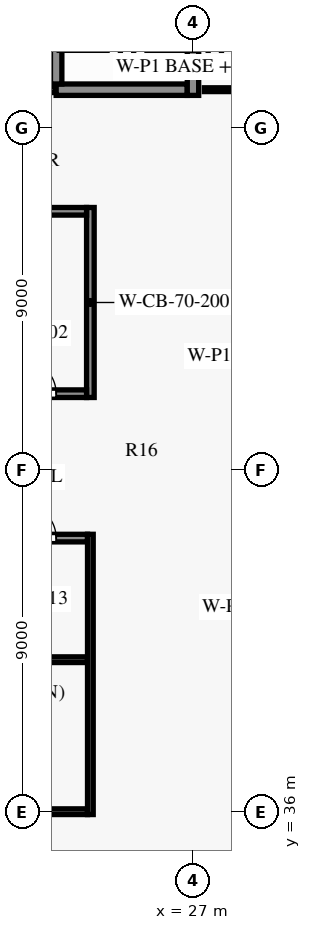
"""IFC4 building model, lengths in metres.
Left out: names, types, materials, properties, quantities, classifications, styles, units other than length and angle.
Written with IfcOpenShell. Run it as: python <this file> out.ifc"""

import sys

from ifc_helpers import new_model, si_unit, direction, frame, frame_2d, origin, place, context, subcontext, project, spatial, rectangle, extrude, element, fill, save


model = new_model("IFC4")
c1 = context("Model", 3, precision=1e-05, world=origin(), true_north=direction((0.0, 1.0)))
c2 = subcontext(c1, "Body", "Model", "MODEL_VIEW")
j1 = project(units=[si_unit("LENGTHUNIT", "METRE"), si_unit("PLANEANGLEUNIT", "RADIAN")], contexts=[c1])
p1 = place(None, origin())
s1 = spatial("IfcSite", under=j1, at=p1, CompositionType="ELEMENT")
p2 = place(p1, origin())
s2 = spatial("IfcBuilding", under=s1, at=p2, CompositionType="ELEMENT")
p3 = place(p2, frame((0.0, 0.0, 130.3)))
s3 = spatial("IfcBuildingStorey", under=s2, at=p3, CompositionType="ELEMENT", Elevation=130.3)
p4 = place(p3, frame((12.4, 36.0, 0.0), z_axis=(0.0, 0.0, 1.0), x_axis=(1.0, 0.0, 0.0)))
e1 = element("IfcWall", 1, at=p4, inside=s3, PredefinedType="SHEAR", context=c2, shape_type="SweptSolid", body=[
    extrude(rectangle(XDim=11.825, YDim=0.15, at=frame_2d((5.913, 0.0))), origin(), (0.0, 0.0, 1.0), 3.5),
])
p5 = place(p4, frame((1.05, 0.0, 0.0)))
e2 = element("IfcOpeningElement", 2, at=p5, cuts=e1, PredefinedType="OPENING", context=c2, shape_type="SweptSolid", body=[
    extrude(rectangle(XDim=0.9, YDim=2.1, at=frame_2d((0.45, 1.05))), frame((0.0, 0.085, 0.0), z_axis=(0.0, -1.0, 0.0), x_axis=(1.0, 0.0, 0.0)), (0.0, 0.0, 1.0), 0.17),
])
p6 = place(p4, frame((4.275, 0.0, 0.0)))
e3 = element("IfcOpeningElement", 3, at=p6, cuts=e1, PredefinedType="OPENING", context=c2, shape_type="SweptSolid", body=[
    extrude(rectangle(XDim=0.95, YDim=2.1, at=frame_2d((0.475, 1.05))), frame((0.0, 0.085, 0.0), z_axis=(0.0, -1.0, 0.0), x_axis=(1.0, 0.0, 0.0)), (0.0, 0.0, 1.0), 0.17),
])
p7 = place(p4, frame((8.75, 0.0, 0.0)))
e4 = element("IfcOpeningElement", 4, at=p7, cuts=e1, PredefinedType="OPENING", context=c2, shape_type="SweptSolid", body=[
    extrude(rectangle(XDim=0.9, YDim=2.1, at=frame_2d((0.45, 1.05))), frame((0.0, 0.085, 0.0), z_axis=(0.0, -1.0, 0.0), x_axis=(1.0, 0.0, 0.0)), (0.0, 0.0, 1.0), 0.17),
])
p8 = place(p3, frame((21.6, 40.0, 0.0), z_axis=(0.0, 0.0, 1.0), x_axis=(1.0, 0.0, 0.0)))
e5 = element("IfcWall", 5, at=p8, inside=s3, PredefinedType="PARTITIONING", context=c2, shape_type="SweptSolid", body=[
    extrude(rectangle(XDim=2.625, YDim=0.15, at=frame_2d((1.312, 0.0))), origin(), (0.0, 0.0, 1.0), 3.5),
])
p9 = place(p3, frame((21.6, 43.2, 0.0), z_axis=(0.0, 0.0, 1.0), x_axis=(1.0, 0.0, 0.0)))
e6 = element("IfcWall", 6, at=p9, inside=s3, PredefinedType="PARTITIONING", context=c2, shape_type="SweptSolid", body=[
    extrude(rectangle(XDim=2.625, YDim=0.2, at=frame_2d((1.312, 0.0))), origin(), (0.0, 0.0, 1.0), 3.5),
])
p10 = place(p9, frame((0.9, 0.0, 0.0)))
e7 = element("IfcOpeningElement", 7, at=p10, cuts=e6, PredefinedType="OPENING", context=c2, shape_type="SweptSolid", body=[
    extrude(rectangle(XDim=0.9, YDim=2.1, at=frame_2d((0.45, 1.05))), frame((0.0, 0.11, 0.0), z_axis=(0.0, -1.0, 0.0), x_axis=(1.0, 0.0, 0.0)), (0.0, 0.0, 1.0), 0.22),
])
p11 = place(p3, frame((21.6, 47.0, 0.0), z_axis=(0.0, 0.0, 1.0), x_axis=(1.0, 0.0, 0.0)))
e8 = element("IfcWall", 8, at=p11, inside=s3, PredefinedType="PARTITIONING", context=c2, shape_type="SweptSolid", body=[
    extrude(rectangle(XDim=2.6, YDim=0.2, at=frame_2d((1.3, 0.0))), origin(), (0.0, 0.0, 1.0), 3.5),
])
p12 = place(p11, frame((0.9, 0.0, 0.0)))
e9 = element("IfcOpeningElement", 9, at=p12, cuts=e8, PredefinedType="OPENING", context=c2, shape_type="SweptSolid", body=[
    extrude(rectangle(XDim=0.9, YDim=2.1, at=frame_2d((0.45, 1.05))), frame((0.0, 0.11, 0.0), z_axis=(0.0, -1.0, 0.0), x_axis=(1.0, 0.0, 0.0)), (0.0, 0.0, 1.0), 0.22),
])
p13 = place(p3, frame((21.6, 51.8, 0.0), z_axis=(0.0, 0.0, 1.0), x_axis=(1.0, 0.0, 0.0)))
e10 = element("IfcWall", 10, at=p13, inside=s3, PredefinedType="PARTITIONING", context=c2, shape_type="SweptSolid", body=[
    extrude(rectangle(XDim=2.6, YDim=0.2, at=frame_2d((1.3, 0.0))), origin(), (0.0, 0.0, 1.0), 3.5),
])
p14 = place(p3, frame((17.5, 55.0, 0.0), z_axis=(0.0, 0.0, 1.0), x_axis=(1.0, 0.0, 0.0)))
e11 = element("IfcWall", 11, at=p14, inside=s3, PredefinedType="PARTITIONING", context=c2, shape_type="SweptSolid", body=[
    extrude(rectangle(XDim=5.9, YDim=0.15, at=frame_2d((2.95, 0.0))), origin(), (0.0, 0.0, 1.0), 3.5),
])
p15 = place(p14, frame((2.45, 0.0, 0.0)))
e12 = element("IfcOpeningElement", 12, at=p15, cuts=e11, PredefinedType="OPENING", context=c2, shape_type="SweptSolid", body=[
    extrude(rectangle(XDim=1.0, YDim=2.1, at=frame_2d((0.5, 1.05))), frame((0.0, 0.085, 0.0), z_axis=(0.0, -1.0, 0.0), x_axis=(1.0, 0.0, 0.0)), (0.0, 0.0, 1.0), 0.17),
])
p16 = place(p3, frame((23.4, 55.0, 0.0), z_axis=(0.0, 0.0, 1.0), x_axis=(1.0, 0.0, 0.0)))
e13 = element("IfcWall", 13, at=p16, inside=s3, PredefinedType="SHEAR", context=c2, shape_type="SweptSolid", body=[
    extrude(rectangle(XDim=3.45, YDim=0.3, at=frame_2d((1.725, 0.0))), origin(), (0.0, 0.0, 1.0), 3.5),
])
p17 = place(p3, frame((23.4, 55.15, 0.0), z_axis=(0.0, 0.0, 1.0), x_axis=(0.0, 1.0, 0.0)))
e14 = element("IfcWall", 14, at=p17, inside=s3, PredefinedType="SHEAR", context=c2, shape_type="SweptSolid", body=[
    extrude(rectangle(XDim=8.0, YDim=0.3, at=frame_2d((4.0, 0.0))), origin(), (0.0, 0.0, 1.0), 3.5),
])
p18 = place(p3, frame((24.3, 35.925, 0.0), z_axis=(0.0, 0.0, 1.0), x_axis=(0.0, 1.0, 0.0)))
e15 = element("IfcWall", 15, at=p18, inside=s3, PredefinedType="PARTITIONING", context=c2, shape_type="SweptSolid", body=[
    extrude(rectangle(XDim=7.375, YDim=0.15, at=frame_2d((3.688, 0.0))), origin(), (0.0, 0.0, 1.0), 3.5),
])
p19 = place(p3, frame((24.3, 46.9, 0.0), z_axis=(0.0, 0.0, 1.0), x_axis=(0.0, 1.0, 0.0)))
e16 = element("IfcWall", 16, at=p19, inside=s3, PredefinedType="SHEAR", context=c2, shape_type="SweptSolid", body=[
    extrude(rectangle(XDim=5.0, YDim=0.2, at=frame_2d((2.5, 0.0))), origin(), (0.0, 0.0, 1.0), 3.5),
])
p20 = place(p3, frame((27.0, 54.85, 0.0), z_axis=(0.0, 0.0, 1.0), x_axis=(0.0, 1.0, 0.0)))
e17 = element("IfcWall", 17, at=p20, inside=s3, PredefinedType="SHEAR", context=c2, shape_type="SweptSolid", body=[
    extrude(rectangle(XDim=8.45, YDim=0.3, at=frame_2d((4.225, 0.0))), origin(), (0.0, 0.0, 1.0), 3.5),
])
p21 = place(p20, frame((6.55, 0.0, 0.0)))
e18 = element("IfcOpeningElement", 18, at=p21, cuts=e17, PredefinedType="OPENING", context=c2, shape_type="SweptSolid", body=[
    extrude(rectangle(XDim=1.2, YDim=2.2, at=frame_2d((0.6, 1.1))), frame((0.0, 0.16, 0.0), z_axis=(0.0, -1.0, 0.0), x_axis=(1.0, 0.0, 0.0)), (0.0, 0.0, 1.0), 0.32),
])
p22 = place(p3, frame((27.3, 55.0, 0.0), z_axis=(0.0, 0.0, 1.0), x_axis=(1.0, 0.0, 0.0)))
e19 = element("IfcWall", 19, at=p22, inside=s3, PredefinedType="PARTITIONING", context=c2, shape_type="SweptSolid", body=[
    extrude(rectangle(XDim=3.25, YDim=0.1, at=frame_2d((1.625, 0.0))), origin(), (0.0, 0.0, 1.0), 3.33),
])
p23 = place(p12, origin())
e20 = element("IfcDoor", 20, at=p23, inside=s3, OperationType="SINGLE_SWING_LEFT", PredefinedType="DOOR", context=c2, shape_type="SweptSolid", body=[
    extrude(rectangle(XDim=0.9, YDim=2.1, at=frame_2d((0.45, 1.05))), frame((0.0, 0.025, 0.0), z_axis=(0.0, -1.0, 0.0), x_axis=(1.0, 0.0, 0.0)), (0.0, 0.0, 1.0), 0.05),
])
fill(e9, e20)
p24 = place(p10, origin())
e21 = element("IfcDoor", 21, at=p24, inside=s3, OperationType="SINGLE_SWING_RIGHT", PredefinedType="DOOR", context=c2, shape_type="SweptSolid", body=[
    extrude(rectangle(XDim=0.9, YDim=2.1, at=frame_2d((0.45, 1.05))), frame((0.0, 0.025, 0.0), z_axis=(0.0, -1.0, 0.0), x_axis=(1.0, 0.0, 0.0)), (0.0, 0.0, 1.0), 0.05),
])
fill(e7, e21)
save(model, sys.argv[1])
